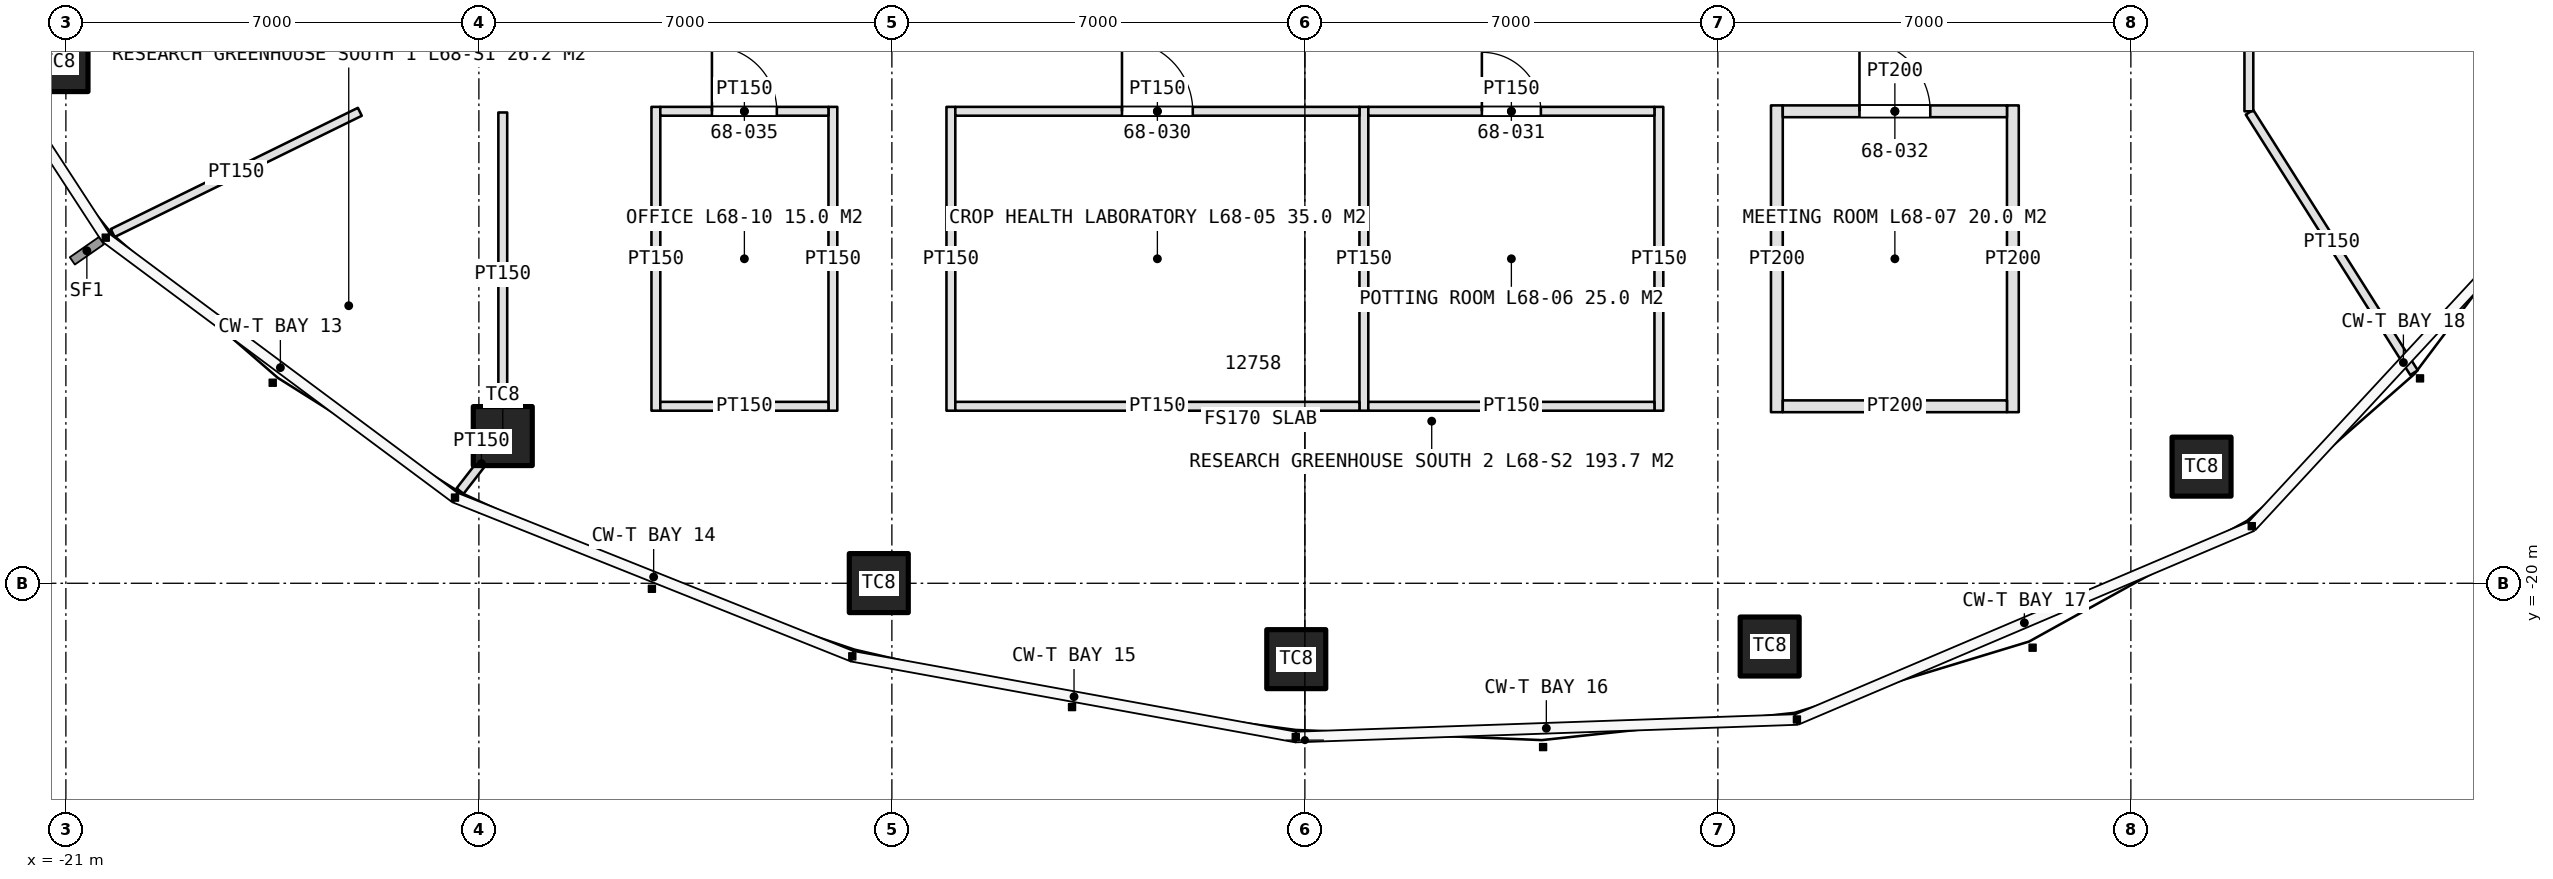
"""IFC4 building model, lengths in metres.
Left out: names, types, materials, properties, quantities, classifications, styles, units other than length and angle.
Written with IfcOpenShell. Run it as: python <this file> out.ifc"""

import sys

from ifc_helpers import new_model, si_unit, direction, frame, frame_2d, origin, origin_2d, place, context, subcontext, project, spatial, rectangle, extrude, element, fill, save


model = new_model("IFC4")
c1 = context("Model", 3, precision=1e-05, world=origin(), true_north=direction((0.0, 1.0)))
c2 = subcontext(c1, "Body", "Model", "MODEL_VIEW")
j1 = project(units=[si_unit("LENGTHUNIT", "METRE"), si_unit("PLANEANGLEUNIT", "RADIAN")], contexts=[c1])
p1 = place(None, origin())
s1 = spatial("IfcSite", under=j1, at=p1, CompositionType="ELEMENT")
p2 = place(p1, origin())
s2 = spatial("IfcBuilding", under=s1, at=p2, CompositionType="ELEMENT")
p3 = place(p2, frame((0.0, 0.0, 304.8)))
s3 = spatial("IfcBuildingStorey", under=s2, at=p3, CompositionType="ELEMENT", Elevation=304.8)
for number, where, z_axis, x_axis in (
    (1, (-21.125, -11.166, 0.0), (0.0, 0.0, 1.0), (1.0, 0.0, 0.0)),
    (2, (-13.595, -17.505, 0.0), (0.0, 0.0, 1.0), (1.0, 0.0, 0.0)),
    (3, (-7.222, -19.997, 0.0), (0.0, 0.0, 1.0), (1.0, 0.0, 0.0)),
    (4, (-0.146, -21.286, 0.0), (0.0, 0.0, 1.0), (1.0, 0.0, 0.0)),
    (5, (7.878, -21.072, 0.0), (0.0, 0.0, 1.0), (1.0, 0.0, 0.0)),
    (6, (15.198, -18.023, 0.0), (0.0, 0.0, 1.0), (1.0, 0.0, 0.0)),
):
    element("IfcColumn", number, at=place(p3, frame(where, z_axis=z_axis, x_axis=x_axis)), inside=s3, PredefinedType="COLUMN", context=c2, shape_type="SweptSolid", body=[
        extrude(rectangle(XDim=1.0, YDim=1.0, at=origin_2d()), origin(), (0.0, 0.0, 1.0), 4.2),
    ])
for number, where, z_axis, x_axis in (
    (7, (-6.0, -11.925, 0.0), (0.0, 0.0, 1.0), (0.0, -1.0, 0.0)),
    (8, (1.0, -11.925, 0.0), (0.0, 0.0, 1.0), (0.0, -1.0, 0.0)),
    (9, (6.0, -11.925, 0.0), (0.0, 0.0, 1.0), (0.0, -1.0, 0.0)),
):
    element("IfcWall", number, at=place(p3, frame(where, z_axis=z_axis, x_axis=x_axis)), inside=s3, PredefinedType="PARTITIONING", context=c2, shape_type="SweptSolid", body=[
        extrude(rectangle(XDim=5.15, YDim=0.15, at=frame_2d((2.575, 0.0))), origin(), (0.0, 0.0, 1.0), 3.0),
    ])
p4 = place(p3, frame((-5.925, -12.0, 0.0), z_axis=(0.0, 0.0, 1.0), x_axis=(1.0, 0.0, 0.0)))
e10 = element("IfcWall", 10, at=p4, inside=s3, PredefinedType="PARTITIONING", context=c2, shape_type="SweptSolid", body=[
    extrude(rectangle(XDim=6.85, YDim=0.15, at=frame_2d((3.425, 0.0))), origin(), (0.0, 0.0, 1.0), 3.0),
])
p5 = place(p4, frame((2.825, 0.0, 0.0)))
e11 = element("IfcOpeningElement", 11, at=p5, cuts=e10, PredefinedType="OPENING", context=c2, shape_type="SweptSolid", body=[
    extrude(rectangle(XDim=1.2, YDim=2.3, at=frame_2d((0.6, 1.15))), frame((0.0, 0.085, 0.0), z_axis=(0.0, -1.0, 0.0), x_axis=(1.0, 0.0, 0.0)), (0.0, 0.0, 1.0), 0.17),
])
p6 = place(p3, frame((-5.925, -17.0, 0.0), z_axis=(0.0, 0.0, 1.0), x_axis=(1.0, 0.0, 0.0)))
e12 = element("IfcWall", 12, at=p6, inside=s3, PredefinedType="PARTITIONING", context=c2, shape_type="SweptSolid", body=[
    extrude(rectangle(XDim=6.85, YDim=0.15, at=frame_2d((3.425, 0.0))), origin(), (0.0, 0.0, 1.0), 3.0),
])
p7 = place(p3, frame((1.075, -12.0, 0.0), z_axis=(0.0, 0.0, 1.0), x_axis=(1.0, 0.0, 0.0)))
e13 = element("IfcWall", 13, at=p7, inside=s3, PredefinedType="PARTITIONING", context=c2, shape_type="SweptSolid", body=[
    extrude(rectangle(XDim=4.85, YDim=0.15, at=frame_2d((2.425, 0.0))), origin(), (0.0, 0.0, 1.0), 3.0),
])
p8 = place(p7, frame((1.925, 0.0, 0.0)))
e14 = element("IfcOpeningElement", 14, at=p8, cuts=e13, PredefinedType="OPENING", context=c2, shape_type="SweptSolid", body=[
    extrude(rectangle(XDim=1.0, YDim=2.2, at=frame_2d((0.5, 1.1))), frame((0.0, 0.085, 0.0), z_axis=(0.0, -1.0, 0.0), x_axis=(1.0, 0.0, 0.0)), (0.0, 0.0, 1.0), 0.17),
])
p9 = place(p3, frame((1.075, -17.0, 0.0), z_axis=(0.0, 0.0, 1.0), x_axis=(1.0, 0.0, 0.0)))
e15 = element("IfcWall", 15, at=p9, inside=s3, PredefinedType="PARTITIONING", context=c2, shape_type="SweptSolid", body=[
    extrude(rectangle(XDim=4.85, YDim=0.15, at=frame_2d((2.425, 0.0))), origin(), (0.0, 0.0, 1.0), 3.0),
])
for number, where, z_axis, x_axis in (
    (16, (8.0, -11.9, 0.0), (0.0, 0.0, 1.0), (0.0, -1.0, 0.0)),
    (17, (12.0, -11.9, 0.0), (0.0, 0.0, 1.0), (0.0, -1.0, 0.0)),
):
    element("IfcWall", number, at=place(p3, frame(where, z_axis=z_axis, x_axis=x_axis)), inside=s3, PredefinedType="PARTITIONING", context=c2, shape_type="SweptSolid", body=[
        extrude(rectangle(XDim=5.2, YDim=0.2, at=frame_2d((2.6, 0.0))), origin(), (0.0, 0.0, 1.0), 3.0),
    ])
p10 = place(p3, frame((8.1, -12.0, 0.0), z_axis=(0.0, 0.0, 1.0), x_axis=(1.0, 0.0, 0.0)))
e18 = element("IfcWall", 18, at=p10, inside=s3, PredefinedType="PARTITIONING", context=c2, shape_type="SweptSolid", body=[
    extrude(rectangle(XDim=3.8, YDim=0.2, at=frame_2d((1.9, 0.0))), origin(), (0.0, 0.0, 1.0), 3.0),
])
p11 = place(p10, frame((1.3, 0.0, 0.0)))
e19 = element("IfcOpeningElement", 19, at=p11, cuts=e18, PredefinedType="OPENING", context=c2, shape_type="SweptSolid", body=[
    extrude(rectangle(XDim=1.2, YDim=2.4, at=frame_2d((0.6, 1.2))), frame((0.0, 0.11, 0.0), z_axis=(0.0, -1.0, 0.0), x_axis=(1.0, 0.0, 0.0)), (0.0, 0.0, 1.0), 0.22),
])
p12 = place(p3, frame((8.1, -17.0, 0.0), z_axis=(0.0, 0.0, 1.0), x_axis=(1.0, 0.0, 0.0)))
e20 = element("IfcWall", 20, at=p12, inside=s3, PredefinedType="PARTITIONING", context=c2, shape_type="SweptSolid", body=[
    extrude(rectangle(XDim=3.8, YDim=0.2, at=frame_2d((1.9, 0.0))), origin(), (0.0, 0.0, 1.0), 3.0),
])
for number, where, z_axis, x_axis in (
    (21, (-11.0, -11.925, 0.0), (0.0, 0.0, 1.0), (0.0, -1.0, 0.0)),
    (22, (-8.0, -11.925, 0.0), (0.0, 0.0, 1.0), (0.0, -1.0, 0.0)),
):
    element("IfcWall", number, at=place(p3, frame(where, z_axis=z_axis, x_axis=x_axis)), inside=s3, PredefinedType="PARTITIONING", context=c2, shape_type="SweptSolid", body=[
        extrude(rectangle(XDim=5.15, YDim=0.15, at=frame_2d((2.575, 0.0))), origin(), (0.0, 0.0, 1.0), 3.0),
    ])
p13 = place(p3, frame((-10.925, -12.0, 0.0), z_axis=(0.0, 0.0, 1.0), x_axis=(1.0, 0.0, 0.0)))
e23 = element("IfcWall", 23, at=p13, inside=s3, PredefinedType="PARTITIONING", context=c2, shape_type="SweptSolid", body=[
    extrude(rectangle(XDim=2.85, YDim=0.15, at=frame_2d((1.425, 0.0))), origin(), (0.0, 0.0, 1.0), 3.0),
])
p14 = place(p13, frame((0.875, 0.0, 0.0)))
e24 = element("IfcOpeningElement", 24, at=p14, cuts=e23, PredefinedType="OPENING", context=c2, shape_type="SweptSolid", body=[
    extrude(rectangle(XDim=1.1, YDim=2.3, at=frame_2d((0.55, 1.15))), frame((0.0, 0.085, 0.0), z_axis=(0.0, -1.0, 0.0), x_axis=(1.0, 0.0, 0.0)), (0.0, 0.0, 1.0), 0.17),
])
p15 = place(p3, frame((-10.925, -17.0, 0.0), z_axis=(0.0, 0.0, 1.0), x_axis=(1.0, 0.0, 0.0)))
e25 = element("IfcWall", 25, at=p15, inside=s3, PredefinedType="PARTITIONING", context=c2, shape_type="SweptSolid", body=[
    extrude(rectangle(XDim=2.85, YDim=0.15, at=frame_2d((1.425, 0.0))), origin(), (0.0, 0.0, 1.0), 3.0),
])
p16 = place(p3, frame((-16.018, -12.009, 0.0), z_axis=(0.0, 0.0, 1.0), x_axis=(-0.897771840996, -0.440460805879, 0.0)))
e26 = element("IfcWall", 26, at=p16, inside=s3, PredefinedType="PARTITIONING", context=c2, shape_type="SweptSolid", body=[
    extrude(rectangle(XDim=4.666, YDim=0.15, at=frame_2d((2.333, 0.0))), origin(), (0.0, 0.0, 1.0), 3.0),
])
p17 = place(p3, frame((16.011, -12.017, 0.0), z_axis=(0.0, 0.0, 1.0), x_axis=(0.53415837449, -0.845384427916, 0.0)))
e27 = element("IfcWall", 27, at=p17, inside=s3, PredefinedType="PARTITIONING", context=c2, shape_type="SweptSolid", body=[
    extrude(rectangle(XDim=5.22, YDim=0.15, at=frame_2d((2.61, 0.0))), origin(), (0.0, 0.0, 1.0), 3.0),
])
p18 = place(p3, frame((-13.595, -12.02, 0.0), z_axis=(0.0, 0.0, 1.0), x_axis=(0.0, -1.0, 0.0)))
e28 = element("IfcWall", 28, at=p18, inside=s3, PredefinedType="PARTITIONING", context=c2, shape_type="SweptSolid", body=[
    extrude(rectangle(XDim=5.485, YDim=0.15, at=frame_2d((2.742, 0.0))), origin(), (0.0, 0.0, 1.0), 3.0),
])
p19 = place(p3, frame((-13.595, -17.505, 0.0), z_axis=(0.0, 0.0, 1.0), x_axis=(-0.61332442804, -0.789831086986, 0.0)))
e29 = element("IfcWall", 29, at=p19, inside=s3, PredefinedType="PARTITIONING", context=c2, shape_type="SweptSolid", body=[
    extrude(rectangle(XDim=1.18, YDim=0.15, at=frame_2d((0.59, 0.0))), origin(), (0.0, 0.0, 1.0), 3.0),
])
p20 = place(p3, frame((16.0, -12.0, 0.0), z_axis=(0.0, 0.0, 1.0), x_axis=(0.0, 1.0, 0.0)))
e30 = element("IfcWall", 30, at=p20, inside=s3, PredefinedType="PARTITIONING", context=c2, shape_type="SweptSolid", body=[
    extrude(rectangle(XDim=8.0, YDim=0.15, at=frame_2d((4.0, 0.0))), origin(), (0.0, 0.0, 1.0), 3.0),
])
p21 = place(p20, frame((5.9, 0.0, 0.0)))
e31 = element("IfcOpeningElement", 31, at=p21, cuts=e30, PredefinedType="OPENING", context=c2, shape_type="SweptSolid", body=[
    extrude(rectangle(XDim=1.6, YDim=2.4, at=frame_2d((0.8, 1.2))), frame((0.0, 0.085, 0.0), z_axis=(0.0, -1.0, 0.0), x_axis=(1.0, 0.0, 0.0)), (0.0, 0.0, 1.0), 0.17),
])
p22 = place(p5, origin())
e32 = element("IfcDoor", 32, at=p22, inside=s3, OperationType="SINGLE_SWING_LEFT", PredefinedType="DOOR", context=c2, shape_type="SweptSolid", body=[
    extrude(rectangle(XDim=1.2, YDim=2.3, at=frame_2d((0.6, 1.15))), frame((0.0, 0.025, 0.0), z_axis=(0.0, -1.0, 0.0), x_axis=(1.0, 0.0, 0.0)), (0.0, 0.0, 1.0), 0.05),
])
fill(e11, e32)
p23 = place(p8, origin())
e33 = element("IfcDoor", 33, at=p23, inside=s3, OperationType="SINGLE_SWING_LEFT", PredefinedType="DOOR", context=c2, shape_type="SweptSolid", body=[
    extrude(rectangle(XDim=1.0, YDim=2.2, at=frame_2d((0.5, 1.1))), frame((0.0, 0.025, 0.0), z_axis=(0.0, -1.0, 0.0), x_axis=(1.0, 0.0, 0.0)), (0.0, 0.0, 1.0), 0.05),
])
fill(e14, e33)
p24 = place(p11, origin())
e34 = element("IfcDoor", 34, at=p24, inside=s3, OperationType="SINGLE_SWING_LEFT", PredefinedType="DOOR", context=c2, shape_type="SweptSolid", body=[
    extrude(rectangle(XDim=1.2, YDim=2.4, at=frame_2d((0.6, 1.2))), frame((0.0, 0.025, 0.0), z_axis=(0.0, -1.0, 0.0), x_axis=(1.0, 0.0, 0.0)), (0.0, 0.0, 1.0), 0.05),
])
fill(e19, e34)
p25 = place(p14, origin())
e35 = element("IfcDoor", 35, at=p25, inside=s3, OperationType="SINGLE_SWING_LEFT", PredefinedType="DOOR", context=c2, shape_type="SweptSolid", body=[
    extrude(rectangle(XDim=1.1, YDim=2.3, at=frame_2d((0.55, 1.15))), frame((0.0, 0.025, 0.0), z_axis=(0.0, -1.0, 0.0), x_axis=(1.0, 0.0, 0.0)), (0.0, 0.0, 1.0), 0.05),
])
fill(e24, e35)
save(model, sys.argv[1])
